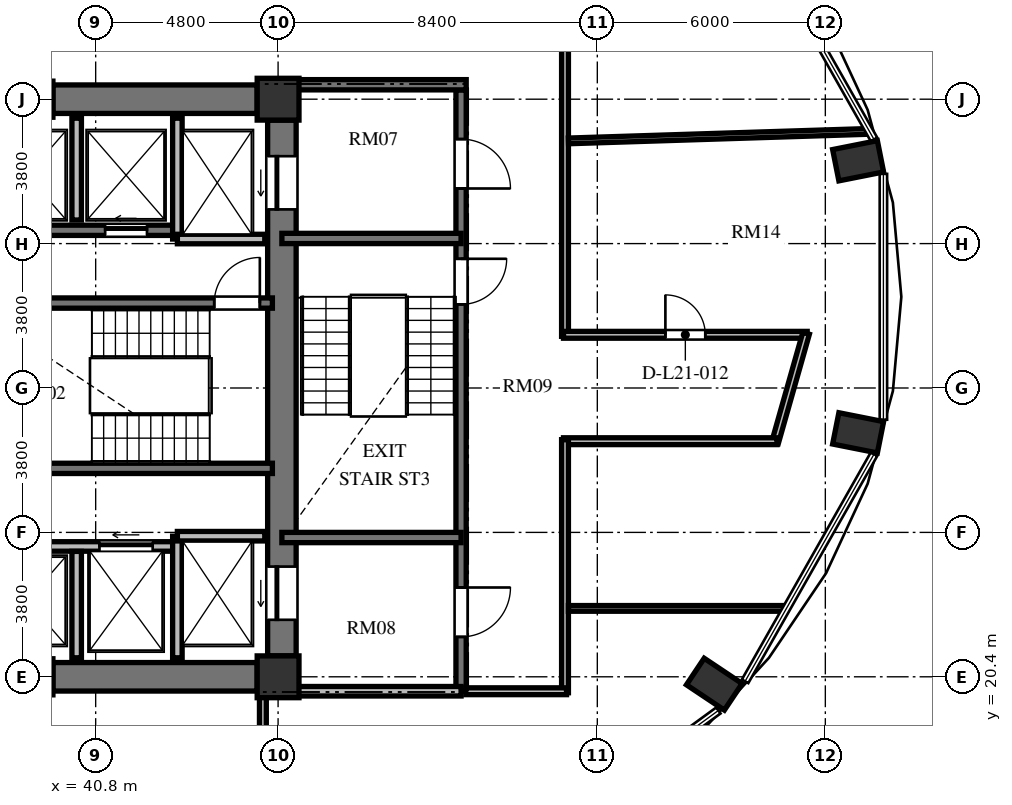
"""IFC4 building model, lengths in metres.
Left out: names, types, materials, properties, quantities, classifications, styles, units other than length and angle.
Written with IfcOpenShell. Run it as: python <this file> out.ifc"""

import sys

from ifc_helpers import new_model, si_unit, direction, frame, frame_2d, origin, origin_2d, place, context, subcontext, project, spatial, rectangle, extrude, element, fill, save


model = new_model("IFC4")
c1 = context("Model", 3, precision=1e-05, world=origin(), true_north=direction((0.0, 1.0)))
c2 = subcontext(c1, "Body", "Model", "MODEL_VIEW")
j1 = project(units=[si_unit("LENGTHUNIT", "METRE"), si_unit("PLANEANGLEUNIT", "RADIAN")], contexts=[c1])
p1 = place(None, origin())
s1 = spatial("IfcSite", under=j1, at=p1, CompositionType="ELEMENT")
p2 = place(p1, origin())
s2 = spatial("IfcBuilding", under=s1, at=p2, CompositionType="ELEMENT")
p3 = place(p2, frame((0.0, 0.0, 85.392)))
s3 = spatial("IfcBuildingStorey", under=s2, at=p3, CompositionType="ELEMENT", Elevation=85.392)
for number, where, z_axis, x_axis in (
    (1, (57.078, 20.205, 0.0), (0.0, 0.0, 1.0), (0.831, -0.556, 0.0)),
    (2, (60.863, 26.82, 0.0), (0.0, 0.0, 1.0), (0.981, -0.195, 0.0)),
    (3, (60.863, 33.98, 0.0), (0.0, 0.0, 1.0), (0.981, 0.195, 0.0)),
):
    element("IfcColumn", number, at=place(p3, frame(where, z_axis=z_axis, x_axis=x_axis)), inside=s3, PredefinedType="COLUMN", context=c2, shape_type="SweptSolid", body=[
        extrude(rectangle(XDim=1.2, YDim=0.84, at=origin_2d()), origin(), (0.0, 0.0, 1.0), 3.648),
    ])
p4 = place(p3, frame((39.2, 20.4, 0.0), z_axis=(0.0, 0.0, 1.0), x_axis=(1.0, 0.0, 0.0)))
e4 = element("IfcColumn", 4, at=p4, inside=s3, PredefinedType="COLUMN", context=c2, shape_type="SweptSolid", body=[
    extrude(rectangle(XDim=0.95, YDim=0.95, at=origin_2d()), origin(), (0.0, 0.0, 1.0), 3.648),
])
for number, where, z_axis, x_axis in (
    (5, (45.6, 20.4, 0.0), (0.0, 0.0, 1.0), (1.0, 0.0, 0.0)),
    (6, (45.6, 35.6, 0.0), (0.0, 0.0, 1.0), (1.0, 0.0, 0.0)),
):
    element("IfcColumn", number, at=place(p3, frame(where, z_axis=z_axis, x_axis=x_axis)), inside=s3, PredefinedType="COLUMN", context=c2, shape_type="SweptSolid", body=[
        extrude(rectangle(XDim=1.1, YDim=1.1, at=origin_2d()), origin(), (0.0, 0.0, 1.0), 3.648),
    ])
p5 = place(p3, frame((39.2, 35.6, 0.0), z_axis=(0.0, 0.0, 1.0), x_axis=(1.0, 0.0, 0.0)))
e7 = element("IfcColumn", 7, at=p5, inside=s3, PredefinedType="COLUMN", context=c2, shape_type="SweptSolid", body=[
    extrude(rectangle(XDim=0.95, YDim=0.95, at=origin_2d()), origin(), (0.0, 0.0, 1.0), 3.648),
])
p6 = place(p3, frame((45.7, 20.95, 0.0), z_axis=(0.0, 0.0, 1.0), x_axis=(0.0, 1.0, 0.0)))
e8 = element("IfcWall", 8, at=p6, inside=s3, PredefinedType="SHEAR", context=c2, shape_type="SweptSolid", body=[
    extrude(rectangle(XDim=14.1, YDim=0.75, at=frame_2d((7.05, 0.0))), origin(), (0.0, 0.0, 1.0), 3.648),
])
p7 = place(p6, frame((11.75, 0.0, 0.0)))
e9 = element("IfcOpeningElement", 9, at=p7, cuts=e8, PredefinedType="OPENING", context=c2, shape_type="SweptSolid", body=[
    extrude(rectangle(XDim=1.4, YDim=2.3, at=frame_2d((0.7, 1.15))), frame((0.0, 0.385, 0.0), z_axis=(0.0, -1.0, 0.0), x_axis=(1.0, 0.0, 0.0)), (0.0, 0.0, 1.0), 0.77),
])
p8 = place(p6, frame((0.95, 0.0, 0.0)))
e10 = element("IfcOpeningElement", 10, at=p8, cuts=e8, PredefinedType="OPENING", context=c2, shape_type="SweptSolid", body=[
    extrude(rectangle(XDim=1.4, YDim=2.3, at=frame_2d((0.7, 1.15))), frame((0.0, 0.385, 0.0), z_axis=(0.0, -1.0, 0.0), x_axis=(1.0, 0.0, 0.0)), (0.0, 0.0, 1.0), 0.77),
])
for number, where, z_axis, x_axis in (
    (11, (39.675, 20.4, 0.0), (0.0, 0.0, 1.0), (1.0, 0.0, 0.0)),
    (12, (39.675, 35.6, 0.0), (0.0, 0.0, 1.0), (1.0, 0.0, 0.0)),
):
    element("IfcWall", number, at=place(p3, frame(where, z_axis=z_axis, x_axis=x_axis)), inside=s3, PredefinedType="SHEAR", context=c2, shape_type="SweptSolid", body=[
        extrude(rectangle(XDim=5.375, YDim=0.75, at=frame_2d((2.688, 0.0))), origin(), (0.0, 0.0, 1.0), 3.648),
    ])
p9 = place(p3, frame((37.465, 30.235, 0.0), z_axis=(0.0, 0.0, 1.0), x_axis=(1.0, 0.0, 0.0)))
e13 = element("IfcWall", 13, at=p9, inside=s3, PredefinedType="SHEAR", context=c2, shape_type="SweptSolid", body=[
    extrude(rectangle(XDim=7.985, YDim=0.27, at=frame_2d((3.992, 0.0))), origin(), (0.0, 0.0, 1.0), 3.648),
])
p10 = place(p9, frame((6.455, 0.0, 0.0)))
e14 = element("IfcOpeningElement", 14, at=p10, cuts=e13, PredefinedType="OPENING", context=c2, shape_type="SweptSolid", body=[
    extrude(rectangle(XDim=1.2, YDim=2.15, at=frame_2d((0.6, 1.075))), frame((0.0, 0.145, 0.0), z_axis=(0.0, -1.0, 0.0), x_axis=(1.0, 0.0, 0.0)), (0.0, 0.0, 1.0), 0.29),
])
p11 = place(p3, frame((37.465, 25.885, 0.0), z_axis=(0.0, 0.0, 1.0), x_axis=(1.0, 0.0, 0.0)))
e15 = element("IfcWall", 15, at=p11, inside=s3, PredefinedType="SHEAR", context=c2, shape_type="SweptSolid", body=[
    extrude(rectangle(XDim=7.985, YDim=0.27, at=frame_2d((3.992, 0.0))), origin(), (0.0, 0.0, 1.0), 3.648),
])
p12 = place(p3, frame((26.55, 32.15, 0.0), z_axis=(0.0, 0.0, 1.0), x_axis=(1.0, 0.0, 0.0)))
e16 = element("IfcWall", 16, at=p12, inside=s3, PredefinedType="SHEAR", context=c2, shape_type="SweptSolid", body=[
    extrude(rectangle(XDim=16.4, YDim=0.27, at=frame_2d((8.2, 0.0))), origin(), (0.0, 0.0, 1.0), 3.648),
])
p13 = place(p12, frame((1.1, 0.0, 0.0)))
e17 = element("IfcOpeningElement", 17, at=p13, cuts=e16, PredefinedType="OPENING", context=c2, shape_type="SweptSolid", body=[
    extrude(rectangle(XDim=1.1, YDim=2.2, at=frame_2d((0.55, 1.1))), frame((0.0, 0.145, 0.0), z_axis=(0.0, -1.0, 0.0), x_axis=(1.0, 0.0, 0.0)), (0.0, 0.0, 1.0), 0.29),
])
p14 = place(p12, frame((3.7, 0.0, 0.0)))
e18 = element("IfcOpeningElement", 18, at=p14, cuts=e16, PredefinedType="OPENING", context=c2, shape_type="SweptSolid", body=[
    extrude(rectangle(XDim=1.1, YDim=2.2, at=frame_2d((0.55, 1.1))), frame((0.0, 0.145, 0.0), z_axis=(0.0, -1.0, 0.0), x_axis=(1.0, 0.0, 0.0)), (0.0, 0.0, 1.0), 0.29),
])
p15 = place(p12, frame((6.5, 0.0, 0.0)))
e19 = element("IfcOpeningElement", 19, at=p15, cuts=e16, PredefinedType="OPENING", context=c2, shape_type="SweptSolid", body=[
    extrude(rectangle(XDim=1.1, YDim=2.2, at=frame_2d((0.55, 1.1))), frame((0.0, 0.145, 0.0), z_axis=(0.0, -1.0, 0.0), x_axis=(1.0, 0.0, 0.0)), (0.0, 0.0, 1.0), 0.29),
])
p16 = place(p12, frame((9.1, 0.0, 0.0)))
e20 = element("IfcOpeningElement", 20, at=p16, cuts=e16, PredefinedType="OPENING", context=c2, shape_type="SweptSolid", body=[
    extrude(rectangle(XDim=1.1, YDim=2.2, at=frame_2d((0.55, 1.1))), frame((0.0, 0.145, 0.0), z_axis=(0.0, -1.0, 0.0), x_axis=(1.0, 0.0, 0.0)), (0.0, 0.0, 1.0), 0.29),
])
p17 = place(p12, frame((11.9, 0.0, 0.0)))
e21 = element("IfcOpeningElement", 21, at=p17, cuts=e16, PredefinedType="OPENING", context=c2, shape_type="SweptSolid", body=[
    extrude(rectangle(XDim=1.1, YDim=2.2, at=frame_2d((0.55, 1.1))), frame((0.0, 0.145, 0.0), z_axis=(0.0, -1.0, 0.0), x_axis=(1.0, 0.0, 0.0)), (0.0, 0.0, 1.0), 0.29),
])
p18 = place(p12, frame((14.5, 0.0, 0.0)))
e22 = element("IfcOpeningElement", 22, at=p18, cuts=e16, PredefinedType="OPENING", context=c2, shape_type="SweptSolid", body=[
    extrude(rectangle(XDim=1.1, YDim=2.2, at=frame_2d((0.55, 1.1))), frame((0.0, 0.145, 0.0), z_axis=(0.0, -1.0, 0.0), x_axis=(1.0, 0.0, 0.0)), (0.0, 0.0, 1.0), 0.29),
])
p19 = place(p3, frame((26.75, 23.83, 0.0), z_axis=(0.0, 0.0, 1.0), x_axis=(1.0, 0.0, 0.0)))
e23 = element("IfcWall", 23, at=p19, inside=s3, PredefinedType="SOLIDWALL", context=c2, shape_type="SweptSolid", body=[
    extrude(rectangle(XDim=16.2, YDim=0.25, at=frame_2d((8.1, 0.0))), origin(), (0.0, 0.0, 1.0), 3.428),
])
p20 = place(p19, frame((0.9, 0.0, 0.0)))
e24 = element("IfcOpeningElement", 24, at=p20, cuts=e23, PredefinedType="OPENING", context=c2, shape_type="SweptSolid", body=[
    extrude(rectangle(XDim=1.1, YDim=2.2, at=frame_2d((0.55, 1.1))), frame((0.0, 0.135, 0.0), z_axis=(0.0, -1.0, 0.0), x_axis=(1.0, 0.0, 0.0)), (0.0, 0.0, 1.0), 0.27),
])
p21 = place(p19, frame((3.5, 0.0, 0.0)))
e25 = element("IfcOpeningElement", 25, at=p21, cuts=e23, PredefinedType="OPENING", context=c2, shape_type="SweptSolid", body=[
    extrude(rectangle(XDim=1.1, YDim=2.2, at=frame_2d((0.55, 1.1))), frame((0.0, 0.135, 0.0), z_axis=(0.0, -1.0, 0.0), x_axis=(1.0, 0.0, 0.0)), (0.0, 0.0, 1.0), 0.27),
])
p22 = place(p19, frame((6.3, 0.0, 0.0)))
e26 = element("IfcOpeningElement", 26, at=p22, cuts=e23, PredefinedType="OPENING", context=c2, shape_type="SweptSolid", body=[
    extrude(rectangle(XDim=1.1, YDim=2.2, at=frame_2d((0.55, 1.1))), frame((0.0, 0.135, 0.0), z_axis=(0.0, -1.0, 0.0), x_axis=(1.0, 0.0, 0.0)), (0.0, 0.0, 1.0), 0.27),
])
p23 = place(p19, frame((8.9, 0.0, 0.0)))
e27 = element("IfcOpeningElement", 27, at=p23, cuts=e23, PredefinedType="OPENING", context=c2, shape_type="SweptSolid", body=[
    extrude(rectangle(XDim=1.1, YDim=2.2, at=frame_2d((0.55, 1.1))), frame((0.0, 0.135, 0.0), z_axis=(0.0, -1.0, 0.0), x_axis=(1.0, 0.0, 0.0)), (0.0, 0.0, 1.0), 0.27),
])
p24 = place(p19, frame((11.7, 0.0, 0.0)))
e28 = element("IfcOpeningElement", 28, at=p24, cuts=e23, PredefinedType="OPENING", context=c2, shape_type="SweptSolid", body=[
    extrude(rectangle(XDim=1.1, YDim=2.2, at=frame_2d((0.55, 1.1))), frame((0.0, 0.135, 0.0), z_axis=(0.0, -1.0, 0.0), x_axis=(1.0, 0.0, 0.0)), (0.0, 0.0, 1.0), 0.27),
])
p25 = place(p19, frame((14.15, 0.0, 0.0)))
e29 = element("IfcOpeningElement", 29, at=p25, cuts=e23, PredefinedType="OPENING", context=c2, shape_type="SweptSolid", body=[
    extrude(rectangle(XDim=1.4, YDim=2.3, at=frame_2d((0.7, 1.15))), frame((0.0, 0.135, 0.0), z_axis=(0.0, -1.0, 0.0), x_axis=(1.0, 0.0, 0.0)), (0.0, 0.0, 1.0), 0.27),
])
p26 = place(p3, frame((42.95, 31.92, 0.0), z_axis=(0.0, 0.0, 1.0), x_axis=(0.0, 1.0, 0.0)))
e30 = element("IfcWall", 30, at=p26, inside=s3, PredefinedType="SOLIDWALL", context=c2, shape_type="SweptSolid", body=[
    extrude(rectangle(XDim=3.18, YDim=0.25, at=frame_2d((1.59, 0.0))), origin(), (0.0, 0.0, 1.0), 3.428),
])
p27 = place(p3, frame((42.95, 31.92, 0.0), z_axis=(0.0, 0.0, 1.0), x_axis=(1.0, 0.0, 0.0)))
e31 = element("IfcWall", 31, at=p27, inside=s3, PredefinedType="SOLIDWALL", context=c2, shape_type="SweptSolid", body=[
    extrude(rectangle(XDim=2.3, YDim=0.25, at=frame_2d((1.15, 0.0))), origin(), (0.0, 0.0, 1.0), 3.428),
])
p28 = place(p3, frame((42.95, 20.9, 0.0), z_axis=(0.0, 0.0, 1.0), x_axis=(0.0, 1.0, 0.0)))
e32 = element("IfcWall", 32, at=p28, inside=s3, PredefinedType="SOLIDWALL", context=c2, shape_type="SweptSolid", body=[
    extrude(rectangle(XDim=3.2, YDim=0.25, at=frame_2d((1.6, 0.0))), origin(), (0.0, 0.0, 1.0), 3.428),
])
p29 = place(p3, frame((42.95, 24.1, 0.0), z_axis=(0.0, 0.0, 1.0), x_axis=(1.0, 0.0, 0.0)))
e33 = element("IfcWall", 33, at=p29, inside=s3, PredefinedType="SOLIDWALL", context=c2, shape_type="SweptSolid", body=[
    extrude(rectangle(XDim=2.3, YDim=0.25, at=frame_2d((1.15, 0.0))), origin(), (0.0, 0.0, 1.0), 3.428),
])
p30 = place(p3, frame((40.3, 32.42, 0.0), z_axis=(0.0, 0.0, 1.0), x_axis=(0.0, 1.0, 0.0)))
e34 = element("IfcWall", 34, at=p30, inside=s3, PredefinedType="SOLIDWALL", context=c2, shape_type="SweptSolid", body=[
    extrude(rectangle(XDim=2.68, YDim=0.25, at=frame_2d((1.34, 0.0))), origin(), (0.0, 0.0, 1.0), 3.428),
])
p31 = place(p3, frame((40.3, 20.9, 0.0), z_axis=(0.0, 0.0, 1.0), x_axis=(0.0, 1.0, 0.0)))
e35 = element("IfcWall", 35, at=p31, inside=s3, PredefinedType="SOLIDWALL", context=c2, shape_type="SweptSolid", body=[
    extrude(rectangle(XDim=2.8, YDim=0.25, at=frame_2d((1.4, 0.0))), origin(), (0.0, 0.0, 1.0), 3.428),
])
p32 = place(p3, frame((50.415, 35.845, 0.0), z_axis=(0.0, 0.0, 1.0), x_axis=(0.0, -1.0, 0.0)))
e36 = element("IfcWall", 36, at=p32, inside=s3, PredefinedType="SHEAR", context=c2, shape_type="SweptSolid", body=[
    extrude(rectangle(XDim=15.825, YDim=0.27, at=frame_2d((7.913, 0.0))), origin(), (0.0, 0.0, 1.0), 3.648),
])
p33 = place(p32, frame((4.445, 0.0, 0.0)))
e37 = element("IfcOpeningElement", 37, at=p33, cuts=e36, PredefinedType="OPENING", context=c2, shape_type="SweptSolid", body=[
    extrude(rectangle(XDim=1.2, YDim=2.15, at=frame_2d((0.6, 1.075))), frame((0.0, 0.145, 0.0), z_axis=(0.0, -1.0, 0.0), x_axis=(1.0, 0.0, 0.0)), (0.0, 0.0, 1.0), 0.29),
])
p34 = place(p32, frame((1.295, 0.0, 0.0)))
e38 = element("IfcOpeningElement", 38, at=p34, cuts=e36, PredefinedType="OPENING", context=c2, shape_type="SweptSolid", body=[
    extrude(rectangle(XDim=1.3, YDim=2.2, at=frame_2d((0.65, 1.1))), frame((0.0, 0.145, 0.0), z_axis=(0.0, -1.0, 0.0), x_axis=(1.0, 0.0, 0.0)), (0.0, 0.0, 1.0), 0.29),
])
p35 = place(p32, frame((13.095, 0.0, 0.0)))
e39 = element("IfcOpeningElement", 39, at=p35, cuts=e36, PredefinedType="OPENING", context=c2, shape_type="SweptSolid", body=[
    extrude(rectangle(XDim=1.3, YDim=2.2, at=frame_2d((0.65, 1.1))), frame((0.0, 0.145, 0.0), z_axis=(0.0, -1.0, 0.0), x_axis=(1.0, 0.0, 0.0)), (0.0, 0.0, 1.0), 0.29),
])
p36 = place(p3, frame((46.075, 35.98, 0.0), z_axis=(0.0, 0.0, 1.0), x_axis=(1.0, 0.0, 0.0)))
e40 = element("IfcWall", 40, at=p36, inside=s3, PredefinedType="SHEAR", context=c2, shape_type="SweptSolid", body=[
    extrude(rectangle(XDim=4.475, YDim=0.27, at=frame_2d((2.238, 0.0))), origin(), (0.0, 0.0, 1.0), 3.648),
])
for number, where, z_axis, x_axis in (
    (41, (45.7, 31.935, 0.0), (0.0, 0.0, 1.0), (1.0, 0.0, 0.0)),
    (42, (45.7, 24.065, 0.0), (0.0, 0.0, 1.0), (1.0, 0.0, 0.0)),
):
    element("IfcWall", number, at=place(p3, frame(where, z_axis=z_axis, x_axis=x_axis)), inside=s3, PredefinedType="SHEAR", context=c2, shape_type="SweptSolid", body=[
        extrude(rectangle(XDim=4.715, YDim=0.27, at=frame_2d((2.357, 0.0))), origin(), (0.0, 0.0, 1.0), 3.648),
    ])
p37 = place(p3, frame((45.7, 20.02, 0.0), z_axis=(0.0, 0.0, 1.0), x_axis=(1.0, 0.0, 0.0)))
e43 = element("IfcWall", 43, at=p37, inside=s3, PredefinedType="SOLIDWALL", context=c2, shape_type="SweptSolid", body=[
    extrude(rectangle(XDim=4.715, YDim=0.25, at=frame_2d((2.357, 0.0))), origin(), (0.0, 0.0, 1.0), 3.428),
])
p38 = place(p3, frame((53.15, 38.79, 0.0), z_axis=(0.0, 0.0, 1.0), x_axis=(0.0, -1.0, 0.0)))
e44 = element("IfcWall", 44, at=p38, inside=s3, PredefinedType="PARTITIONING", context=c2, shape_type="SweptSolid", body=[
    extrude(rectangle(XDim=9.43, YDim=0.18, at=frame_2d((4.715, 0.0))), origin(), (0.0, 0.0, 1.0), 3.428),
])
p39 = place(p3, frame((53.11, 29.4, 0.0), z_axis=(0.0, 0.0, 1.0), x_axis=(1.0, 0.0, 0.0)))
e45 = element("IfcWall", 45, at=p39, inside=s3, PredefinedType="PARTITIONING", context=c2, shape_type="SweptSolid", body=[
    extrude(rectangle(XDim=6.413, YDim=0.18, at=frame_2d((3.206, 0.0))), origin(), (0.0, 0.0, 1.0), 3.428),
])
p40 = place(p39, frame((2.681, 0.0, 0.0)))
e46 = element("IfcOpeningElement", 46, at=p40, cuts=e45, PredefinedType="OPENING", context=c2, shape_type="SweptSolid", body=[
    extrude(rectangle(XDim=1.05, YDim=2.15, at=frame_2d((0.525, 1.075))), frame((0.0, 0.1, 0.0), z_axis=(0.0, -1.0, 0.0), x_axis=(1.0, 0.0, 0.0)), (0.0, 0.0, 1.0), 0.2),
])
p41 = place(p3, frame((59.494, 29.438, 0.0), z_axis=(0.0, 0.0, 1.0), x_axis=(-0.273222154729, -0.961950962453, 0.0)))
e47 = element("IfcWall", 47, at=p41, inside=s3, PredefinedType="PARTITIONING", context=c2, shape_type="SweptSolid", body=[
    extrude(rectangle(XDim=2.991, YDim=0.18, at=frame_2d((1.495, 0.0))), origin(), (0.0, 0.0, 1.0), 3.428),
])
p42 = place(p3, frame((58.727, 26.6, 0.0), z_axis=(0.0, 0.0, 1.0), x_axis=(-1.0, 0.0, 0.0)))
e48 = element("IfcWall", 48, at=p42, inside=s3, PredefinedType="PARTITIONING", context=c2, shape_type="SweptSolid", body=[
    extrude(rectangle(XDim=5.617, YDim=0.18, at=frame_2d((2.809, 0.0))), origin(), (0.0, 0.0, 1.0), 3.428),
])
p43 = place(p3, frame((53.15, 26.64, 0.0), z_axis=(0.0, 0.0, 1.0), x_axis=(0.0, -1.0, 0.0)))
e49 = element("IfcWall", 49, at=p43, inside=s3, PredefinedType="PARTITIONING", context=c2, shape_type="SweptSolid", body=[
    extrude(rectangle(XDim=6.66, YDim=0.18, at=frame_2d((3.33, 0.0))), origin(), (0.0, 0.0, 1.0), 3.428),
])
p44 = place(p3, frame((53.19, 20.02, 0.0), z_axis=(0.0, 0.0, 1.0), x_axis=(-1.0, 0.0, 0.0)))
e50 = element("IfcWall", 50, at=p44, inside=s3, PredefinedType="PARTITIONING", context=c2, shape_type="SweptSolid", body=[
    extrude(rectangle(XDim=2.65, YDim=0.18, at=frame_2d((1.325, 0.0))), origin(), (0.0, 0.0, 1.0), 3.428),
])
p45 = place(p3, frame((45.2, 19.91, 0.0), z_axis=(0.0, 0.0, 1.0), x_axis=(0.0, -1.0, 0.0)))
e51 = element("IfcWall", 51, at=p45, inside=s3, PredefinedType="PARTITIONING", context=c2, shape_type="SweptSolid", body=[
    extrude(rectangle(XDim=2.55, YDim=0.18, at=frame_2d((1.275, 0.0))), origin(), (0.0, 0.0, 1.0), 3.428),
])
p46 = place(p3, frame((53.24, 22.2, 0.0), z_axis=(0.0, 0.0, 1.0), x_axis=(1.0, 0.0, 0.0)))
e52 = element("IfcWall", 52, at=p46, inside=s3, PredefinedType="PARTITIONING", context=c2, shape_type="SweptSolid", body=[
    extrude(rectangle(XDim=5.731, YDim=0.15, at=frame_2d((2.866, 0.0))), origin(), (0.0, 0.0, 1.0), 3.428),
])
p47 = place(p3, frame((53.24, 34.502, 0.0), z_axis=(0.0, 0.0, 1.0), x_axis=(0.999499445349, 0.031636351679, 0.0)))
e53 = element("IfcWall", 53, at=p47, inside=s3, PredefinedType="PARTITIONING", context=c2, shape_type="SweptSolid", body=[
    extrude(rectangle(XDim=7.933, YDim=0.15, at=frame_2d((3.967, 0.0))), origin(), (0.0, 0.0, 1.0), 2.813),
])
p48 = place(p10, origin())
e54 = element("IfcDoor", 54, at=p48, inside=s3, OperationType="SINGLE_SWING_RIGHT", PredefinedType="DOOR", context=c2, shape_type="SweptSolid", body=[
    extrude(rectangle(XDim=1.2, YDim=2.15, at=frame_2d((0.6, 1.075))), frame((0.0, 0.025, 0.0), z_axis=(0.0, -1.0, 0.0), x_axis=(1.0, 0.0, 0.0)), (0.0, 0.0, 1.0), 0.05),
])
fill(e14, e54)
p49 = place(p18, origin())
e55 = element("IfcDoor", 55, at=p49, inside=s3, OperationType="SLIDING_TO_LEFT", PredefinedType="DOOR", context=c2, shape_type="SweptSolid", body=[
    extrude(rectangle(XDim=1.1, YDim=2.2, at=frame_2d((0.55, 1.1))), frame((0.0, 0.025, 0.0), z_axis=(0.0, -1.0, 0.0), x_axis=(1.0, 0.0, 0.0)), (0.0, 0.0, 1.0), 0.05),
])
fill(e22, e55)
p50 = place(p7, origin())
e56 = element("IfcDoor", 56, at=p50, inside=s3, OperationType="SLIDING_TO_LEFT", PredefinedType="DOOR", context=c2, shape_type="SweptSolid", body=[
    extrude(rectangle(XDim=1.4, YDim=2.3, at=frame_2d((0.7, 1.15))), frame((0.0, 0.025, 0.0), z_axis=(0.0, -1.0, 0.0), x_axis=(1.0, 0.0, 0.0)), (0.0, 0.0, 1.0), 0.05),
])
fill(e9, e56)
p51 = place(p8, origin())
e57 = element("IfcDoor", 57, at=p51, inside=s3, OperationType="SLIDING_TO_LEFT", PredefinedType="DOOR", context=c2, shape_type="SweptSolid", body=[
    extrude(rectangle(XDim=1.4, YDim=2.3, at=frame_2d((0.7, 1.15))), frame((0.0, 0.025, 0.0), z_axis=(0.0, -1.0, 0.0), x_axis=(1.0, 0.0, 0.0)), (0.0, 0.0, 1.0), 0.05),
])
fill(e10, e57)
p52 = place(p25, origin())
e58 = element("IfcDoor", 58, at=p52, inside=s3, OperationType="SLIDING_TO_LEFT", PredefinedType="DOOR", context=c2, shape_type="SweptSolid", body=[
    extrude(rectangle(XDim=1.4, YDim=2.3, at=frame_2d((0.7, 1.15))), frame((0.0, 0.025, 0.0), z_axis=(0.0, -1.0, 0.0), x_axis=(1.0, 0.0, 0.0)), (0.0, 0.0, 1.0), 0.05),
])
fill(e29, e58)
p53 = place(p33, origin())
e59 = element("IfcDoor", 59, at=p53, inside=s3, OperationType="SINGLE_SWING_LEFT", PredefinedType="DOOR", context=c2, shape_type="SweptSolid", body=[
    extrude(rectangle(XDim=1.2, YDim=2.15, at=frame_2d((0.6, 1.075))), frame((0.0, 0.025, 0.0), z_axis=(0.0, -1.0, 0.0), x_axis=(1.0, 0.0, 0.0)), (0.0, 0.0, 1.0), 0.05),
])
fill(e37, e59)
p54 = place(p34, origin())
e60 = element("IfcDoor", 60, at=p54, inside=s3, OperationType="SINGLE_SWING_RIGHT", PredefinedType="DOOR", context=c2, shape_type="SweptSolid", body=[
    extrude(rectangle(XDim=1.3, YDim=2.2, at=frame_2d((0.65, 1.1))), frame((0.0, 0.025, 0.0), z_axis=(0.0, -1.0, 0.0), x_axis=(1.0, 0.0, 0.0)), (0.0, 0.0, 1.0), 0.05),
])
fill(e38, e60)
p55 = place(p35, origin())
e61 = element("IfcDoor", 61, at=p55, inside=s3, OperationType="SINGLE_SWING_LEFT", PredefinedType="DOOR", context=c2, shape_type="SweptSolid", body=[
    extrude(rectangle(XDim=1.3, YDim=2.2, at=frame_2d((0.65, 1.1))), frame((0.0, 0.025, 0.0), z_axis=(0.0, -1.0, 0.0), x_axis=(1.0, 0.0, 0.0)), (0.0, 0.0, 1.0), 0.05),
])
fill(e39, e61)
p56 = place(p40, origin())
e62 = element("IfcDoor", 62, at=p56, inside=s3, OperationType="SINGLE_SWING_LEFT", PredefinedType="DOOR", context=c2, shape_type="SweptSolid", body=[
    extrude(rectangle(XDim=1.05, YDim=2.15, at=frame_2d((0.525, 1.075))), frame((0.0, 0.025, 0.0), z_axis=(0.0, -1.0, 0.0), x_axis=(1.0, 0.0, 0.0)), (0.0, 0.0, 1.0), 0.05),
])
fill(e46, e62)
save(model, sys.argv[1])
